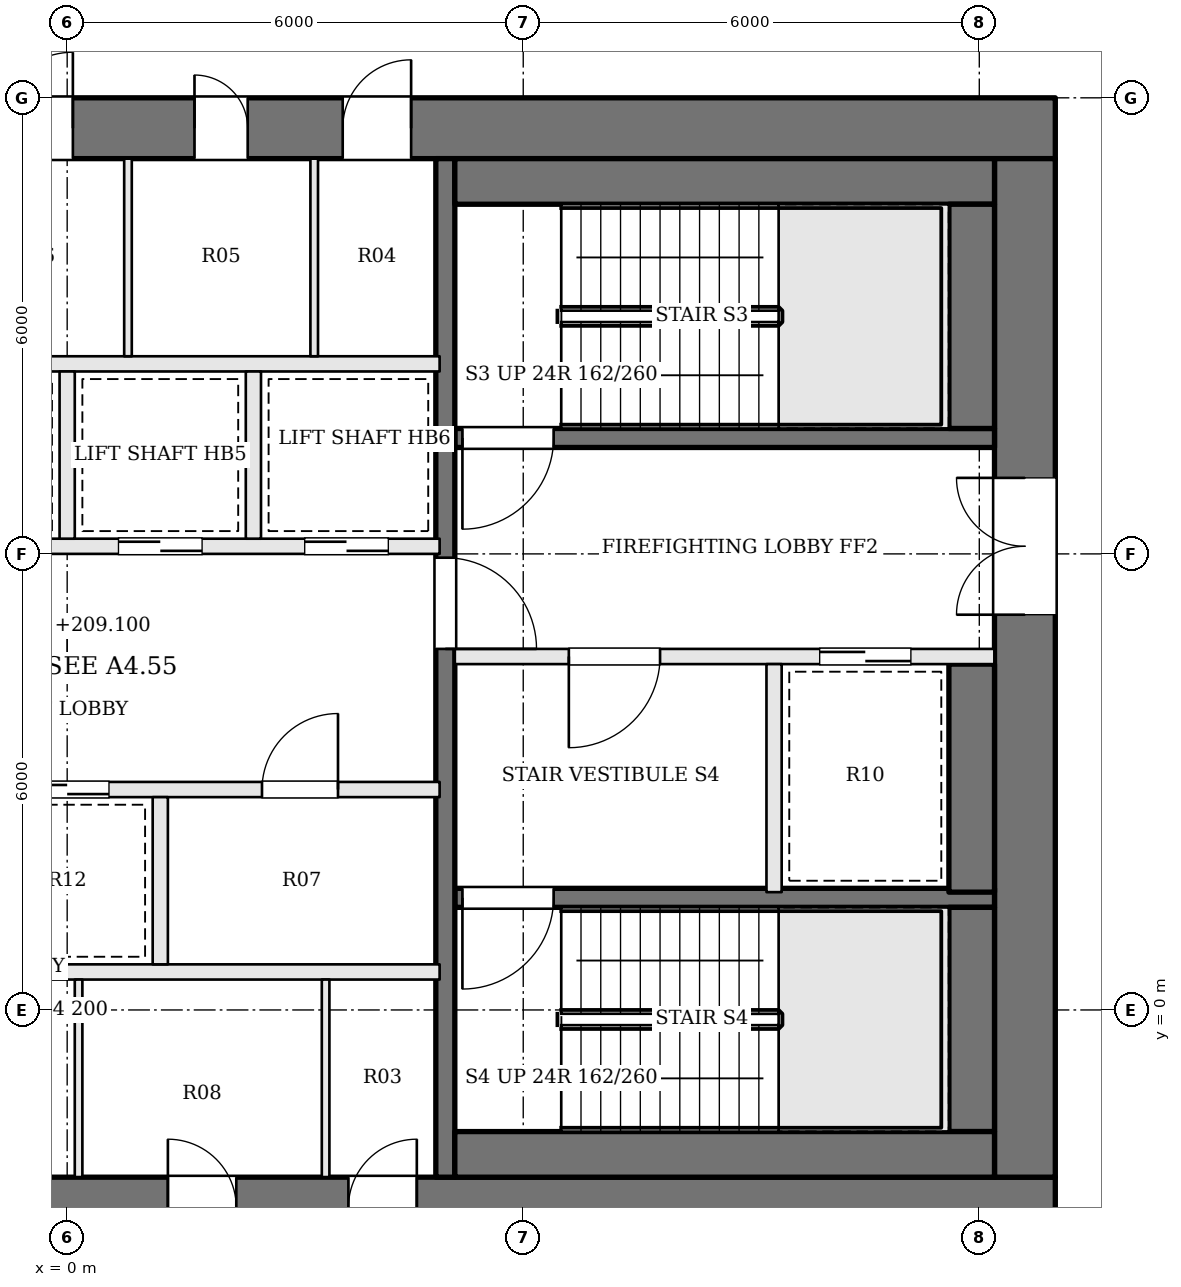
"""IFC4 building model, lengths in metres.
Left out: names, types, materials, properties, quantities, classifications, styles, units other than length and angle.
Written with IfcOpenShell. Run it as: python <this file> out.ifc"""

import sys

from ifc_helpers import new_model, si_unit, direction, frame, frame_2d, origin, place, context, subcontext, project, spatial, rectangle, extrude, element, fill, save


model = new_model("IFC4")
c1 = context("Model", 3, precision=1e-05, world=origin(), true_north=direction((0.0, 1.0)))
c2 = subcontext(c1, "Body", "Model", "MODEL_VIEW")
j1 = project(units=[si_unit("LENGTHUNIT", "METRE"), si_unit("PLANEANGLEUNIT", "RADIAN")], contexts=[c1])
p1 = place(None, origin())
s1 = spatial("IfcSite", under=j1, at=p1, CompositionType="ELEMENT")
p2 = place(p1, origin())
s2 = spatial("IfcBuilding", under=s1, at=p2, CompositionType="ELEMENT")
p3 = place(p2, frame((0.0, 0.0, 209.1)))
s3 = spatial("IfcBuildingStorey", under=s2, at=p3, CompositionType="ELEMENT", Elevation=209.1)
p4 = place(p3, frame((-13.0, 11.6, 0.0), z_axis=(0.0, 0.0, 1.0), x_axis=(1.0, 0.0, 0.0)))
e1 = element("IfcWall", 1, at=p4, inside=s3, PredefinedType="SHEAR", context=c2, shape_type="SweptSolid", body=[
    extrude(rectangle(XDim=26.0, YDim=0.8, at=frame_2d((13.0, 0.0))), origin(), (0.0, 0.0, 1.0), 3.9),
])
p5 = place(p4, frame((9.375, 0.0, 0.0)))
e2 = element("IfcOpeningElement", 2, at=p5, cuts=e1, PredefinedType="OPENING", context=c2, shape_type="SweptSolid", body=[
    extrude(rectangle(XDim=0.7, YDim=2.1, at=frame_2d((0.35, 1.05))), frame((0.0, 0.41, 0.0), z_axis=(0.0, -1.0, 0.0), x_axis=(1.0, 0.0, 0.0)), (0.0, 0.0, 1.0), 0.82),
])
p6 = place(p4, frame((12.075, 0.0, 0.0)))
e3 = element("IfcOpeningElement", 3, at=p6, cuts=e1, PredefinedType="OPENING", context=c2, shape_type="SweptSolid", body=[
    extrude(rectangle(XDim=1.0, YDim=2.1, at=frame_2d((0.5, 1.05))), frame((0.0, 0.41, 0.0), z_axis=(0.0, -1.0, 0.0), x_axis=(1.0, 0.0, 0.0)), (0.0, 0.0, 1.0), 0.82),
])
p7 = place(p4, frame((14.675, 0.0, 0.0)))
e4 = element("IfcOpeningElement", 4, at=p7, cuts=e1, PredefinedType="OPENING", context=c2, shape_type="SweptSolid", body=[
    extrude(rectangle(XDim=0.7, YDim=2.1, at=frame_2d((0.35, 1.05))), frame((0.0, 0.41, 0.0), z_axis=(0.0, -1.0, 0.0), x_axis=(1.0, 0.0, 0.0)), (0.0, 0.0, 1.0), 0.82),
])
p8 = place(p4, frame((16.625, 0.0, 0.0)))
e5 = element("IfcOpeningElement", 5, at=p8, cuts=e1, PredefinedType="OPENING", context=c2, shape_type="SweptSolid", body=[
    extrude(rectangle(XDim=0.9, YDim=2.1, at=frame_2d((0.45, 1.05))), frame((0.0, 0.41, 0.0), z_axis=(0.0, -1.0, 0.0), x_axis=(1.0, 0.0, 0.0)), (0.0, 0.0, 1.0), 0.82),
])
p9 = place(p3, frame((-13.0, -2.6, 0.0), z_axis=(0.0, 0.0, 1.0), x_axis=(1.0, 0.0, 0.0)))
e6 = element("IfcWall", 6, at=p9, inside=s3, PredefinedType="SHEAR", context=c2, shape_type="SweptSolid", body=[
    extrude(rectangle(XDim=26.0, YDim=0.8, at=frame_2d((13.0, 0.0))), origin(), (0.0, 0.0, 1.0), 3.9),
])
p10 = place(p9, frame((9.275, 0.0, 0.0)))
e7 = element("IfcOpeningElement", 7, at=p10, cuts=e6, PredefinedType="OPENING", context=c2, shape_type="SweptSolid", body=[
    extrude(rectangle(XDim=0.9, YDim=2.1, at=frame_2d((0.45, 1.05))), frame((0.0, 0.41, 0.0), z_axis=(0.0, -1.0, 0.0), x_axis=(1.0, 0.0, 0.0)), (0.0, 0.0, 1.0), 0.82),
])
p11 = place(p9, frame((11.75, 0.0, 0.0)))
e8 = element("IfcOpeningElement", 8, at=p11, cuts=e6, PredefinedType="OPENING", context=c2, shape_type="SweptSolid", body=[
    extrude(rectangle(XDim=1.0, YDim=2.1, at=frame_2d((0.5, 1.05))), frame((0.0, 0.41, 0.0), z_axis=(0.0, -1.0, 0.0), x_axis=(1.0, 0.0, 0.0)), (0.0, 0.0, 1.0), 0.82),
])
p12 = place(p9, frame((14.325, 0.0, 0.0)))
e9 = element("IfcOpeningElement", 9, at=p12, cuts=e6, PredefinedType="OPENING", context=c2, shape_type="SweptSolid", body=[
    extrude(rectangle(XDim=0.9, YDim=2.1, at=frame_2d((0.45, 1.05))), frame((0.0, 0.41, 0.0), z_axis=(0.0, -1.0, 0.0), x_axis=(1.0, 0.0, 0.0)), (0.0, 0.0, 1.0), 0.82),
])
p13 = place(p9, frame((16.7, 0.0, 0.0)))
e10 = element("IfcOpeningElement", 10, at=p13, cuts=e6, PredefinedType="OPENING", context=c2, shape_type="SweptSolid", body=[
    extrude(rectangle(XDim=0.9, YDim=2.1, at=frame_2d((0.45, 1.05))), frame((0.0, 0.41, 0.0), z_axis=(0.0, -1.0, 0.0), x_axis=(1.0, 0.0, 0.0)), (0.0, 0.0, 1.0), 0.82),
])
p14 = place(p3, frame((12.6, -2.2, 0.0), z_axis=(0.0, 0.0, 1.0), x_axis=(0.0, 1.0, 0.0)))
e11 = element("IfcWall", 11, at=p14, inside=s3, PredefinedType="SHEAR", context=c2, shape_type="SweptSolid", body=[
    extrude(rectangle(XDim=13.4, YDim=0.8, at=frame_2d((6.7, 0.0))), origin(), (0.0, 0.0, 1.0), 3.9),
])
p15 = place(p14, frame((7.4, 0.0, 0.0)))
e12 = element("IfcOpeningElement", 12, at=p15, cuts=e11, PredefinedType="OPENING", context=c2, shape_type="SweptSolid", body=[
    extrude(rectangle(XDim=1.8, YDim=2.1, at=frame_2d((0.9, 1.05))), frame((0.0, 0.41, 0.0), z_axis=(0.0, -1.0, 0.0), x_axis=(1.0, 0.0, 0.0)), (0.0, 0.0, 1.0), 0.82),
])
p16 = place(p3, frame((12.2, 7.525, 0.0), z_axis=(0.0, 0.0, 1.0), x_axis=(-1.0, 0.0, 0.0)))
e13 = element("IfcWall", 13, at=p16, inside=s3, PredefinedType="SOLIDWALL", context=c2, shape_type="SweptSolid", body=[
    extrude(rectangle(XDim=7.1, YDim=0.25, at=frame_2d((3.55, 0.0))), origin(), (0.0, 0.0, 1.0), 3.7),
])
p17 = place(p16, frame((5.8, 0.0, 0.0)))
e14 = element("IfcOpeningElement", 14, at=p17, cuts=e13, PredefinedType="OPENING", context=c2, shape_type="SweptSolid", body=[
    extrude(rectangle(XDim=1.2, YDim=2.1, at=frame_2d((0.6, 1.05))), frame((0.0, 0.135, 0.0), z_axis=(0.0, -1.0, 0.0), x_axis=(1.0, 0.0, 0.0)), (0.0, 0.0, 1.0), 0.27),
])
p18 = place(p3, frame((12.2, 4.65, 0.0), z_axis=(0.0, 0.0, 1.0), x_axis=(-1.0, 0.0, 0.0)))
e15 = element("IfcWall", 15, at=p18, inside=s3, PredefinedType="SOLIDWALL", context=c2, shape_type="SweptSolid", body=[
    extrude(rectangle(XDim=7.1, YDim=0.2, at=frame_2d((3.55, 0.0))), origin(), (0.0, 0.0, 1.0), 3.7),
])
p19 = place(p18, frame((4.4, 0.0, 0.0)))
e16 = element("IfcOpeningElement", 16, at=p19, cuts=e15, PredefinedType="OPENING", context=c2, shape_type="SweptSolid", body=[
    extrude(rectangle(XDim=1.2, YDim=2.1, at=frame_2d((0.6, 1.05))), frame((0.0, 0.11, 0.0), z_axis=(0.0, -1.0, 0.0), x_axis=(1.0, 0.0, 0.0)), (0.0, 0.0, 1.0), 0.22),
])
p20 = place(p18, frame((1.1, 0.0, 0.0)))
e17 = element("IfcOpeningElement", 17, at=p20, cuts=e15, PredefinedType="OPENING", context=c2, shape_type="SweptSolid", body=[
    extrude(rectangle(XDim=1.2, YDim=2.1, at=frame_2d((0.6, 1.05))), frame((0.0, 0.11, 0.0), z_axis=(0.0, -1.0, 0.0), x_axis=(1.0, 0.0, 0.0)), (0.0, 0.0, 1.0), 0.22),
])
p21 = place(p3, frame((12.2, 1.475, 0.0), z_axis=(0.0, 0.0, 1.0), x_axis=(-1.0, 0.0, 0.0)))
e18 = element("IfcWall", 18, at=p21, inside=s3, PredefinedType="SOLIDWALL", context=c2, shape_type="SweptSolid", body=[
    extrude(rectangle(XDim=7.1, YDim=0.25, at=frame_2d((3.55, 0.0))), origin(), (0.0, 0.0, 1.0), 3.7),
])
p22 = place(p21, frame((5.8, 0.0, 0.0)))
e19 = element("IfcOpeningElement", 19, at=p22, cuts=e18, PredefinedType="OPENING", context=c2, shape_type="SweptSolid", body=[
    extrude(rectangle(XDim=1.2, YDim=2.1, at=frame_2d((0.6, 1.05))), frame((0.0, 0.135, 0.0), z_axis=(0.0, -1.0, 0.0), x_axis=(1.0, 0.0, 0.0)), (0.0, 0.0, 1.0), 0.27),
])
p23 = place(p3, frame((9.3, 4.55, 0.0), z_axis=(0.0, 0.0, 1.0), x_axis=(0.0, -1.0, 0.0)))
e20 = element("IfcWall", 20, at=p23, inside=s3, PredefinedType="SOLIDWALL", context=c2, shape_type="SweptSolid", body=[
    extrude(rectangle(XDim=3.0, YDim=0.2, at=frame_2d((1.5, 0.0))), origin(), (0.0, 0.0, 1.0), 3.7),
])
p24 = place(p3, frame((4.975, 11.2, 0.0), z_axis=(0.0, 0.0, 1.0), x_axis=(0.0, -1.0, 0.0)))
e21 = element("IfcWall", 21, at=p24, inside=s3, PredefinedType="SOLIDWALL", context=c2, shape_type="SweptSolid", body=[
    extrude(rectangle(XDim=13.4, YDim=0.25, at=frame_2d((6.7, 0.0))), origin(), (0.0, 0.0, 1.0), 3.7),
])
p25 = place(p24, frame((5.25, 0.0, 0.0)))
e22 = element("IfcOpeningElement", 22, at=p25, cuts=e21, PredefinedType="OPENING", context=c2, shape_type="SweptSolid", body=[
    extrude(rectangle(XDim=1.2, YDim=2.1, at=frame_2d((0.6, 1.05))), frame((0.0, 0.135, 0.0), z_axis=(0.0, -1.0, 0.0), x_axis=(1.0, 0.0, 0.0)), (0.0, 0.0, 1.0), 0.27),
])
p26 = place(p3, frame((12.2, 10.9, 0.0), z_axis=(0.0, 0.0, 1.0), x_axis=(-1.0, 0.0, 0.0)))
e23 = element("IfcWall", 23, at=p26, inside=s3, PredefinedType="SOLIDWALL", context=c2, shape_type="SweptSolid", body=[
    extrude(rectangle(XDim=7.1, YDim=0.6, at=frame_2d((3.55, 0.0))), origin(), (0.0, 0.0, 1.0), 3.7),
])
p27 = place(p3, frame((11.9, 10.6, 0.0), z_axis=(0.0, 0.0, 1.0), x_axis=(0.0, -1.0, 0.0)))
e24 = element("IfcWall", 24, at=p27, inside=s3, PredefinedType="SOLIDWALL", context=c2, shape_type="SweptSolid", body=[
    extrude(rectangle(XDim=2.95, YDim=0.6, at=frame_2d((1.475, 0.0))), origin(), (0.0, 0.0, 1.0), 3.7),
])
p28 = place(p3, frame((11.9, 4.55, 0.0), z_axis=(0.0, 0.0, 1.0), x_axis=(0.0, -1.0, 0.0)))
e25 = element("IfcWall", 25, at=p28, inside=s3, PredefinedType="SOLIDWALL", context=c2, shape_type="SweptSolid", body=[
    extrude(rectangle(XDim=3.0, YDim=0.6, at=frame_2d((1.5, 0.0))), origin(), (0.0, 0.0, 1.0), 3.7),
])
p29 = place(p3, frame((11.9, 1.35, 0.0), z_axis=(0.0, 0.0, 1.0), x_axis=(0.0, -1.0, 0.0)))
e26 = element("IfcWall", 26, at=p29, inside=s3, PredefinedType="SOLIDWALL", context=c2, shape_type="SweptSolid", body=[
    extrude(rectangle(XDim=2.95, YDim=0.6, at=frame_2d((1.475, 0.0))), origin(), (0.0, 0.0, 1.0), 3.7),
])
p30 = place(p3, frame((12.2, -1.9, 0.0), z_axis=(0.0, 0.0, 1.0), x_axis=(-1.0, 0.0, 0.0)))
e27 = element("IfcWall", 27, at=p30, inside=s3, PredefinedType="SOLIDWALL", context=c2, shape_type="SweptSolid", body=[
    extrude(rectangle(XDim=7.1, YDim=0.6, at=frame_2d((3.55, 0.0))), origin(), (0.0, 0.0, 1.0), 3.7),
])
p31 = place(p3, frame((-4.9, 0.5, 0.0), z_axis=(0.0, 0.0, 1.0), x_axis=(1.0, 0.0, 0.0)))
e28 = element("IfcWall", 28, at=p31, inside=s3, PredefinedType="SOLIDWALL", context=c2, shape_type="SweptSolid", body=[
    extrude(rectangle(XDim=9.8, YDim=0.2, at=frame_2d((4.9, 0.0))), origin(), (0.0, 0.0, 1.0), 3.7),
])
p32 = place(p3, frame((-4.9, 2.9, 0.0), z_axis=(0.0, 0.0, 1.0), x_axis=(1.0, 0.0, 0.0)))
e29 = element("IfcWall", 29, at=p32, inside=s3, PredefinedType="SOLIDWALL", context=c2, shape_type="SweptSolid", body=[
    extrude(rectangle(XDim=9.8, YDim=0.2, at=frame_2d((4.9, 0.0))), origin(), (0.0, 0.0, 1.0), 3.7),
])
p33 = place(p32, frame((0.675, 0.0, 0.0)))
e30 = element("IfcOpeningElement", 30, at=p33, cuts=e29, PredefinedType="OPENING", context=c2, shape_type="SweptSolid", body=[
    extrude(rectangle(XDim=1.1, YDim=2.1, at=frame_2d((0.55, 1.05))), frame((0.0, 0.11, 0.0), z_axis=(0.0, -1.0, 0.0), x_axis=(1.0, 0.0, 0.0)), (0.0, 0.0, 1.0), 0.22),
])
p34 = place(p32, frame((2.613, 0.0, 0.0)))
e31 = element("IfcOpeningElement", 31, at=p34, cuts=e29, PredefinedType="OPENING", context=c2, shape_type="SweptSolid", body=[
    extrude(rectangle(XDim=0.9, YDim=2.1, at=frame_2d((0.45, 1.05))), frame((0.0, 0.11, 0.0), z_axis=(0.0, -1.0, 0.0), x_axis=(1.0, 0.0, 0.0)), (0.0, 0.0, 1.0), 0.22),
])
p35 = place(p32, frame((4.35, 0.0, 0.0)))
e32 = element("IfcOpeningElement", 32, at=p35, cuts=e29, PredefinedType="OPENING", context=c2, shape_type="SweptSolid", body=[
    extrude(rectangle(XDim=1.1, YDim=2.1, at=frame_2d((0.55, 1.05))), frame((0.0, 0.11, 0.0), z_axis=(0.0, -1.0, 0.0), x_axis=(1.0, 0.0, 0.0)), (0.0, 0.0, 1.0), 0.22),
])
p36 = place(p32, frame((7.463, 0.0, 0.0)))
e33 = element("IfcOpeningElement", 33, at=p36, cuts=e29, PredefinedType="OPENING", context=c2, shape_type="SweptSolid", body=[
    extrude(rectangle(XDim=1.0, YDim=2.1, at=frame_2d((0.5, 1.05))), frame((0.0, 0.11, 0.0), z_axis=(0.0, -1.0, 0.0), x_axis=(1.0, 0.0, 0.0)), (0.0, 0.0, 1.0), 0.22),
])
p37 = place(p3, frame((-4.9, 6.1, 0.0), z_axis=(0.0, 0.0, 1.0), x_axis=(1.0, 0.0, 0.0)))
e34 = element("IfcWall", 34, at=p37, inside=s3, PredefinedType="SOLIDWALL", context=c2, shape_type="SweptSolid", body=[
    extrude(rectangle(XDim=9.8, YDim=0.2, at=frame_2d((4.9, 0.0))), origin(), (0.0, 0.0, 1.0), 3.7),
])
p38 = place(p37, frame((0.675, 0.0, 0.0)))
e35 = element("IfcOpeningElement", 35, at=p38, cuts=e34, PredefinedType="OPENING", context=c2, shape_type="SweptSolid", body=[
    extrude(rectangle(XDim=1.1, YDim=2.1, at=frame_2d((0.55, 1.05))), frame((0.0, 0.11, 0.0), z_axis=(0.0, -1.0, 0.0), x_axis=(1.0, 0.0, 0.0)), (0.0, 0.0, 1.0), 0.22),
])
p39 = place(p37, frame((3.125, 0.0, 0.0)))
e36 = element("IfcOpeningElement", 36, at=p39, cuts=e34, PredefinedType="OPENING", context=c2, shape_type="SweptSolid", body=[
    extrude(rectangle(XDim=1.1, YDim=2.1, at=frame_2d((0.55, 1.05))), frame((0.0, 0.11, 0.0), z_axis=(0.0, -1.0, 0.0), x_axis=(1.0, 0.0, 0.0)), (0.0, 0.0, 1.0), 0.22),
])
p40 = place(p37, frame((5.575, 0.0, 0.0)))
e37 = element("IfcOpeningElement", 37, at=p40, cuts=e34, PredefinedType="OPENING", context=c2, shape_type="SweptSolid", body=[
    extrude(rectangle(XDim=1.1, YDim=2.1, at=frame_2d((0.55, 1.05))), frame((0.0, 0.11, 0.0), z_axis=(0.0, -1.0, 0.0), x_axis=(1.0, 0.0, 0.0)), (0.0, 0.0, 1.0), 0.22),
])
p41 = place(p37, frame((8.025, 0.0, 0.0)))
e38 = element("IfcOpeningElement", 38, at=p41, cuts=e34, PredefinedType="OPENING", context=c2, shape_type="SweptSolid", body=[
    extrude(rectangle(XDim=1.1, YDim=2.1, at=frame_2d((0.55, 1.05))), frame((0.0, 0.11, 0.0), z_axis=(0.0, -1.0, 0.0), x_axis=(1.0, 0.0, 0.0)), (0.0, 0.0, 1.0), 0.22),
])
p42 = place(p3, frame((-4.9, 8.5, 0.0), z_axis=(0.0, 0.0, 1.0), x_axis=(1.0, 0.0, 0.0)))
e39 = element("IfcWall", 39, at=p42, inside=s3, PredefinedType="SOLIDWALL", context=c2, shape_type="SweptSolid", body=[
    extrude(rectangle(XDim=9.8, YDim=0.2, at=frame_2d((4.9, 0.0))), origin(), (0.0, 0.0, 1.0), 3.7),
])
for number, where, z_axis, x_axis in (
    (40, (1.225, 0.6, 0.0), (0.0, 0.0, 1.0), (0.0, 1.0, 0.0)),
    (41, (0.0, 6.2, 0.0), (0.0, 0.0, 1.0), (0.0, 1.0, 0.0)),
    (42, (2.45, 6.2, 0.0), (0.0, 0.0, 1.0), (0.0, 1.0, 0.0)),
):
    element("IfcWall", number, at=place(p3, frame(where, z_axis=z_axis, x_axis=x_axis)), inside=s3, PredefinedType="SOLIDWALL", context=c2, shape_type="SweptSolid", body=[
        extrude(rectangle(XDim=2.2, YDim=0.2, at=frame_2d((1.1, 0.0))), origin(), (0.0, 0.0, 1.0), 3.7),
    ])
for number, where, z_axis, x_axis in (
    (43, (0.15, -2.2, 0.0), (0.0, 0.0, 1.0), (0.0, 1.0, 0.0)),
    (44, (3.4, -2.2, 0.0), (0.0, 0.0, 1.0), (0.0, 1.0, 0.0)),
    (45, (0.8, 8.6, 0.0), (0.0, 0.0, 1.0), (0.0, 1.0, 0.0)),
    (46, (3.25, 8.6, 0.0), (0.0, 0.0, 1.0), (0.0, 1.0, 0.0)),
):
    element("IfcWall", number, at=place(p3, frame(where, z_axis=z_axis, x_axis=x_axis)), inside=s3, PredefinedType="PARTITIONING", context=c2, shape_type="SweptSolid", body=[
        extrude(rectangle(XDim=2.6, YDim=0.1, at=frame_2d((1.3, 0.0))), origin(), (0.0, 0.0, 1.0), 3.7),
    ])
p43 = place(p15, origin())
e47 = element("IfcDoor", 47, at=p43, inside=s3, OperationType="DOUBLE_DOOR_SINGLE_SWING", PredefinedType="DOOR", context=c2, shape_type="SweptSolid", body=[
    extrude(rectangle(XDim=1.8, YDim=2.1, at=frame_2d((0.9, 1.05))), frame((0.0, 0.025, 0.0), z_axis=(0.0, -1.0, 0.0), x_axis=(1.0, 0.0, 0.0)), (0.0, 0.0, 1.0), 0.05),
])
fill(e12, e47)
p44 = place(p25, origin())
e48 = element("IfcDoor", 48, at=p44, inside=s3, OperationType="SINGLE_SWING_RIGHT", PredefinedType="DOOR", context=c2, shape_type="SweptSolid", body=[
    extrude(rectangle(XDim=1.2, YDim=2.1, at=frame_2d((0.6, 1.05))), frame((0.0, 0.025, 0.0), z_axis=(0.0, -1.0, 0.0), x_axis=(1.0, 0.0, 0.0)), (0.0, 0.0, 1.0), 0.05),
])
fill(e22, e48)
p45 = place(p19, origin())
e49 = element("IfcDoor", 49, at=p45, inside=s3, OperationType="SINGLE_SWING_RIGHT", PredefinedType="DOOR", context=c2, shape_type="SweptSolid", body=[
    extrude(rectangle(XDim=1.2, YDim=2.1, at=frame_2d((0.6, 1.05))), frame((0.0, 0.025, 0.0), z_axis=(0.0, -1.0, 0.0), x_axis=(1.0, 0.0, 0.0)), (0.0, 0.0, 1.0), 0.05),
])
fill(e16, e49)
p46 = place(p17, origin())
e50 = element("IfcDoor", 50, at=p46, inside=s3, OperationType="SINGLE_SWING_RIGHT", PredefinedType="DOOR", context=c2, shape_type="SweptSolid", body=[
    extrude(rectangle(XDim=1.2, YDim=2.1, at=frame_2d((0.6, 1.05))), frame((0.0, 0.025, 0.0), z_axis=(0.0, -1.0, 0.0), x_axis=(1.0, 0.0, 0.0)), (0.0, 0.0, 1.0), 0.05),
])
fill(e14, e50)
p47 = place(p22, origin())
e51 = element("IfcDoor", 51, at=p47, inside=s3, OperationType="SINGLE_SWING_RIGHT", PredefinedType="DOOR", context=c2, shape_type="SweptSolid", body=[
    extrude(rectangle(XDim=1.2, YDim=2.1, at=frame_2d((0.6, 1.05))), frame((0.0, 0.025, 0.0), z_axis=(0.0, -1.0, 0.0), x_axis=(1.0, 0.0, 0.0)), (0.0, 0.0, 1.0), 0.05),
])
fill(e19, e51)
p48 = place(p20, origin())
e52 = element("IfcDoor", 52, at=p48, inside=s3, OperationType="SLIDING_TO_RIGHT", PredefinedType="DOOR", context=c2, shape_type="SweptSolid", body=[
    extrude(rectangle(XDim=1.2, YDim=2.1, at=frame_2d((0.6, 1.05))), frame((0.0, 0.025, 0.0), z_axis=(0.0, -1.0, 0.0), x_axis=(1.0, 0.0, 0.0)), (0.0, 0.0, 1.0), 0.05),
])
fill(e17, e52)
p49 = place(p35, origin())
e53 = element("IfcDoor", 53, at=p49, inside=s3, OperationType="SLIDING_TO_LEFT", PredefinedType="DOOR", context=c2, shape_type="SweptSolid", body=[
    extrude(rectangle(XDim=1.1, YDim=2.1, at=frame_2d((0.55, 1.05))), frame((0.0, 0.025, 0.0), z_axis=(0.0, -1.0, 0.0), x_axis=(1.0, 0.0, 0.0)), (0.0, 0.0, 1.0), 0.05),
])
fill(e32, e53)
p50 = place(p36, origin())
e54 = element("IfcDoor", 54, at=p50, inside=s3, OperationType="SINGLE_SWING_RIGHT", PredefinedType="DOOR", context=c2, shape_type="SweptSolid", body=[
    extrude(rectangle(XDim=1.0, YDim=2.1, at=frame_2d((0.5, 1.05))), frame((0.0, 0.025, 0.0), z_axis=(0.0, -1.0, 0.0), x_axis=(1.0, 0.0, 0.0)), (0.0, 0.0, 1.0), 0.05),
])
fill(e33, e54)
p51 = place(p40, origin())
e55 = element("IfcDoor", 55, at=p51, inside=s3, OperationType="SLIDING_TO_RIGHT", PredefinedType="DOOR", context=c2, shape_type="SweptSolid", body=[
    extrude(rectangle(XDim=1.1, YDim=2.1, at=frame_2d((0.55, 1.05))), frame((0.0, 0.025, 0.0), z_axis=(0.0, -1.0, 0.0), x_axis=(1.0, 0.0, 0.0)), (0.0, 0.0, 1.0), 0.05),
])
fill(e37, e55)
p52 = place(p41, origin())
e56 = element("IfcDoor", 56, at=p52, inside=s3, OperationType="SLIDING_TO_LEFT", PredefinedType="DOOR", context=c2, shape_type="SweptSolid", body=[
    extrude(rectangle(XDim=1.1, YDim=2.1, at=frame_2d((0.55, 1.05))), frame((0.0, 0.025, 0.0), z_axis=(0.0, -1.0, 0.0), x_axis=(1.0, 0.0, 0.0)), (0.0, 0.0, 1.0), 0.05),
])
fill(e38, e56)
p53 = place(p12, origin())
e57 = element("IfcDoor", 57, at=p53, inside=s3, OperationType="SINGLE_SWING_LEFT", PredefinedType="DOOR", context=c2, shape_type="SweptSolid", body=[
    extrude(rectangle(XDim=0.9, YDim=2.1, at=frame_2d((0.45, 1.05))), frame((0.0, 0.025, 0.0), z_axis=(0.0, -1.0, 0.0), x_axis=(1.0, 0.0, 0.0)), (0.0, 0.0, 1.0), 0.05),
])
fill(e9, e57)
p54 = place(p13, origin())
e58 = element("IfcDoor", 58, at=p54, inside=s3, OperationType="SINGLE_SWING_RIGHT", PredefinedType="DOOR", context=c2, shape_type="SweptSolid", body=[
    extrude(rectangle(XDim=0.9, YDim=2.1, at=frame_2d((0.45, 1.05))), frame((0.0, 0.025, 0.0), z_axis=(0.0, -1.0, 0.0), x_axis=(1.0, 0.0, 0.0)), (0.0, 0.0, 1.0), 0.05),
])
fill(e10, e58)
p55 = place(p6, origin())
e59 = element("IfcDoor", 59, at=p55, inside=s3, OperationType="SINGLE_SWING_RIGHT", PredefinedType="DOOR", context=c2, shape_type="SweptSolid", body=[
    extrude(rectangle(XDim=1.0, YDim=2.1, at=frame_2d((0.5, 1.05))), frame((0.0, 0.025, 0.0), z_axis=(0.0, -1.0, 0.0), x_axis=(1.0, 0.0, 0.0)), (0.0, 0.0, 1.0), 0.05),
])
fill(e3, e59)
p56 = place(p7, origin())
e60 = element("IfcDoor", 60, at=p56, inside=s3, OperationType="SINGLE_SWING_LEFT", PredefinedType="DOOR", context=c2, shape_type="SweptSolid", body=[
    extrude(rectangle(XDim=0.7, YDim=2.1, at=frame_2d((0.35, 1.05))), frame((0.0, 0.025, 0.0), z_axis=(0.0, -1.0, 0.0), x_axis=(1.0, 0.0, 0.0)), (0.0, 0.0, 1.0), 0.05),
])
fill(e4, e60)
p57 = place(p8, origin())
e61 = element("IfcDoor", 61, at=p57, inside=s3, OperationType="SINGLE_SWING_RIGHT", PredefinedType="DOOR", context=c2, shape_type="SweptSolid", body=[
    extrude(rectangle(XDim=0.9, YDim=2.1, at=frame_2d((0.45, 1.05))), frame((0.0, 0.025, 0.0), z_axis=(0.0, -1.0, 0.0), x_axis=(1.0, 0.0, 0.0)), (0.0, 0.0, 1.0), 0.05),
])
fill(e5, e61)
save(model, sys.argv[1])
